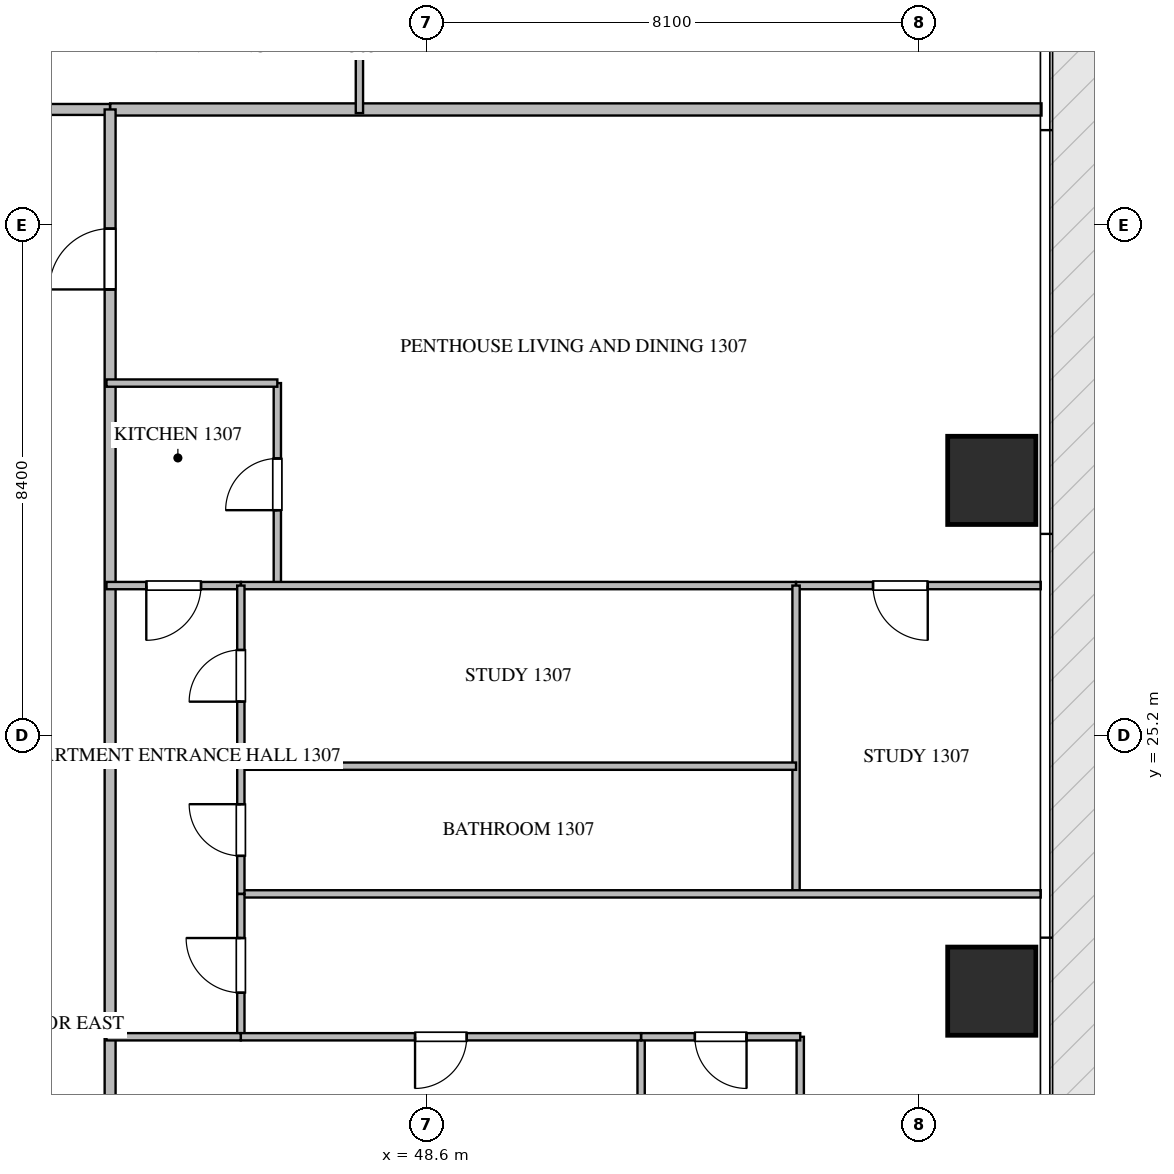
"""IFC4 building model, lengths in metres.
Left out: names, types, materials, properties, quantities, classifications, styles, units other than length and angle.
Written with IfcOpenShell. Run it as: python <this file> out.ifc"""

import sys

from ifc_helpers import new_model, si_unit, direction, frame, frame_2d, origin, origin_2d, place, context, subcontext, project, spatial, rectangle, extrude, source, transform, mapped, element, fill, save


model = new_model("IFC4")
c1 = context("Model", 3, precision=1e-05, world=origin(), true_north=direction((0.0, 1.0)))
c2 = subcontext(c1, "Body", "Model", "MODEL_VIEW")
j1 = project(units=[si_unit("LENGTHUNIT", "METRE"), si_unit("PLANEANGLEUNIT", "RADIAN")], contexts=[c1])
p1 = place(None, origin())
s1 = spatial("IfcSite", under=j1, at=p1, CompositionType="ELEMENT")
p2 = place(p1, origin())
s2 = spatial("IfcBuilding", under=s1, at=p2, CompositionType="ELEMENT")
p3 = place(p2, frame((0.0, 0.0, 56.7)))
s3 = spatial("IfcBuildingStorey", under=s2, at=p3, CompositionType="ELEMENT", Elevation=56.7)
m1 = source(origin(), c2, "Body", "SweptSolid", [
    extrude(rectangle(XDim=1.45, YDim=1.45, at=origin_2d()), origin(), (0.0, 0.0, 1.0), 3.75),
])
for number, where, z_axis, x_axis in (
    (1, (57.9, 21.0, -0.26), (0.0, 0.0, 1.0), (1.0, 0.0, 0.0)),
    (2, (57.9, 29.4, -0.26), (0.0, 0.0, 1.0), (1.0, 0.0, 0.0)),
):
    element("IfcColumn", number, at=place(p3, frame(where, z_axis=z_axis, x_axis=x_axis)), inside=s3, PredefinedType="COLUMN", context=c2, shape_type="MappedRepresentation", body=[
        mapped(m1, transform((0.0, 0.0, 0.0), scale=1.0)),
    ])
p4 = place(p3, frame((43.4, 35.5, 0.0), z_axis=(0.0, 0.0, 1.0), x_axis=(1.0, 0.0, 0.0)))
e3 = element("IfcWall", 3, at=p4, inside=s3, PredefinedType="PARTITIONING", context=c2, shape_type="SweptSolid", body=[
    extrude(rectangle(XDim=15.318, YDim=0.2, at=frame_2d((7.659, 0.0))), origin(), (0.0, 0.0, 1.0), 3.49),
])
p5 = place(p3, frame((21.402, 35.5, 0.0), z_axis=(0.0, 0.0, 1.0), x_axis=(1.0, 0.0, 0.0)))
e4 = element("IfcWall", 4, at=p5, inside=s3, PredefinedType="PARTITIONING", context=c2, shape_type="SweptSolid", body=[
    extrude(rectangle(XDim=21.996, YDim=0.18, at=frame_2d((10.998, 0.0))), origin(), (0.0, 0.0, 1.0), 3.49),
])
p6 = place(p5, frame((15.222, 0.0, 0.0)))
e5 = element("IfcOpeningElement", 5, at=p6, cuts=e4, PredefinedType="OPENING", context=c2, shape_type="SweptSolid", body=[
    extrude(rectangle(XDim=1.0, YDim=2.15, at=frame_2d((0.5, 1.075))), frame((0.0, 0.1, 0.0), z_axis=(0.0, -1.0, 0.0), x_axis=(1.0, 0.0, 0.0)), (0.0, 0.0, 1.0), 0.2),
])
p7 = place(p3, frame((43.4, 14.9, 0.0), z_axis=(0.0, 0.0, 1.0), x_axis=(0.0, 1.0, 0.0)))
e6 = element("IfcWall", 6, at=p7, inside=s3, PredefinedType="PARTITIONING", context=c2, shape_type="SweptSolid", body=[
    extrude(rectangle(XDim=20.6, YDim=0.18, at=frame_2d((10.3, 0.0))), origin(), (0.0, 0.0, 1.0), 3.49),
])
p8 = place(p7, frame((17.64, 0.0, 0.0)))
e7 = element("IfcOpeningElement", 7, at=p8, cuts=e6, PredefinedType="OPENING", context=c2, shape_type="SweptSolid", body=[
    extrude(rectangle(XDim=1.0, YDim=2.15, at=frame_2d((0.5, 1.075))), frame((0.0, 0.1, 0.0), z_axis=(0.0, -1.0, 0.0), x_axis=(1.0, 0.0, 0.0)), (0.0, 0.0, 1.0), 0.2),
])
p9 = place(p3, frame((47.5, 37.648, 0.0), z_axis=(0.0, 0.0, 1.0), x_axis=(0.0, -1.0, 0.0)))
e8 = element("IfcWall", 8, at=p9, inside=s3, PredefinedType="PARTITIONING", context=c2, shape_type="SweptSolid", body=[
    extrude(rectangle(XDim=2.208, YDim=0.12, at=frame_2d((1.104, 0.0))), origin(), (0.0, 0.0, 1.0), 3.49),
])
p10 = place(p3, frame((46.15, 27.67, 0.0), z_axis=(0.0, 0.0, 1.0), x_axis=(0.0, 1.0, 0.0)))
e9 = element("IfcWall", 9, at=p10, inside=s3, PredefinedType="PARTITIONING", context=c2, shape_type="SweptSolid", body=[
    extrude(rectangle(XDim=3.33, YDim=0.12, at=frame_2d((1.665, 0.0))), origin(), (0.0, 0.0, 1.0), 3.49),
])
p11 = place(p10, frame((1.24, 0.0, 0.0)))
e10 = element("IfcOpeningElement", 10, at=p11, cuts=e9, PredefinedType="OPENING", context=c2, shape_type="SweptSolid", body=[
    extrude(rectangle(XDim=0.85, YDim=2.1, at=frame_2d((0.425, 1.05))), frame((0.0, 0.07, 0.0), z_axis=(0.0, -1.0, 0.0), x_axis=(1.0, 0.0, 0.0)), (0.0, 0.0, 1.0), 0.14),
])
p12 = place(p3, frame((46.15, 31.0, 0.0), z_axis=(0.0, 0.0, 1.0), x_axis=(-1.0, 0.0, 0.0)))
e11 = element("IfcWall", 11, at=p12, inside=s3, PredefinedType="PARTITIONING", context=c2, shape_type="SweptSolid", body=[
    extrude(rectangle(XDim=2.81, YDim=0.12, at=frame_2d((1.405, 0.0))), origin(), (0.0, 0.0, 1.0), 3.49),
])
p13 = place(p3, frame((45.55, 27.67, 0.0), z_axis=(0.0, 0.0, 1.0), x_axis=(-1.0, 0.0, 0.0)))
e12 = element("IfcWall", 12, at=p13, inside=s3, PredefinedType="PARTITIONING", context=c2, shape_type="SweptSolid", body=[
    extrude(rectangle(XDim=2.21, YDim=0.12, at=frame_2d((1.105, 0.0))), origin(), (0.0, 0.0, 1.0), 3.49),
])
p14 = place(p13, frame((0.655, 0.0, 0.0)))
e13 = element("IfcOpeningElement", 13, at=p14, cuts=e12, PredefinedType="OPENING", context=c2, shape_type="SweptSolid", body=[
    extrude(rectangle(XDim=0.9, YDim=2.1, at=frame_2d((0.45, 1.05))), frame((0.0, 0.07, 0.0), z_axis=(0.0, -1.0, 0.0), x_axis=(1.0, 0.0, 0.0)), (0.0, 0.0, 1.0), 0.14),
])
p15 = place(p3, frame((58.705, 27.67, 0.0), z_axis=(0.0, 0.0, 1.0), x_axis=(-1.0, 0.0, 0.0)))
e14 = element("IfcWall", 14, at=p15, inside=s3, PredefinedType="PARTITIONING", context=c2, shape_type="SweptSolid", body=[
    extrude(rectangle(XDim=4.024, YDim=0.12, at=frame_2d((2.012, 0.0))), origin(), (0.0, 0.0, 1.0), 3.49),
])
p16 = place(p15, frame((1.858, 0.0, 0.0)))
e15 = element("IfcOpeningElement", 15, at=p16, cuts=e14, PredefinedType="OPENING", context=c2, shape_type="SweptSolid", body=[
    extrude(rectangle(XDim=0.9, YDim=2.1, at=frame_2d((0.45, 1.05))), frame((0.0, 0.07, 0.0), z_axis=(0.0, -1.0, 0.0), x_axis=(1.0, 0.0, 0.0)), (0.0, 0.0, 1.0), 0.14),
])
p17 = place(p3, frame((54.679, 27.67, 0.0), z_axis=(0.0, 0.0, 1.0), x_axis=(-1.0, 0.0, 0.0)))
e16 = element("IfcWall", 16, at=p17, inside=s3, PredefinedType="PARTITIONING", context=c2, shape_type="SweptSolid", body=[
    extrude(rectangle(XDim=9.127, YDim=0.12, at=frame_2d((4.563, 0.0))), origin(), (0.0, 0.0, 1.0), 3.49),
])
p18 = place(p3, frame((54.681, 22.6, 0.0), z_axis=(0.0, 0.0, 1.0), x_axis=(0.0, 1.0, 0.0)))
e17 = element("IfcWall", 17, at=p18, inside=s3, PredefinedType="PARTITIONING", context=c2, shape_type="SweptSolid", body=[
    extrude(rectangle(XDim=5.07, YDim=0.12, at=frame_2d((2.535, 0.0))), origin(), (0.0, 0.0, 1.0), 3.49),
])
p19 = place(p3, frame((58.705, 22.6, 0.0), z_axis=(0.0, 0.0, 1.0), x_axis=(-1.0, 0.0, 0.0)))
e18 = element("IfcWall", 18, at=p19, inside=s3, PredefinedType="PARTITIONING", context=c2, shape_type="SweptSolid", body=[
    extrude(rectangle(XDim=13.155, YDim=0.12, at=frame_2d((6.578, 0.0))), origin(), (0.0, 0.0, 1.0), 3.49),
])
p20 = place(p3, frame((54.681, 24.7, 0.0), z_axis=(0.0, 0.0, 1.0), x_axis=(-1.0, 0.0, 0.0)))
e19 = element("IfcWall", 19, at=p20, inside=s3, PredefinedType="PARTITIONING", context=c2, shape_type="SweptSolid", body=[
    extrude(rectangle(XDim=9.131, YDim=0.12, at=frame_2d((4.565, 0.0))), origin(), (0.0, 0.0, 1.0), 3.49),
])
p21 = place(p3, frame((45.55, 22.6, 0.0), z_axis=(0.0, 0.0, 1.0), x_axis=(0.0, 1.0, 0.0)))
e20 = element("IfcWall", 20, at=p21, inside=s3, PredefinedType="PARTITIONING", context=c2, shape_type="SweptSolid", body=[
    extrude(rectangle(XDim=2.1, YDim=0.12, at=frame_2d((1.05, 0.0))), origin(), (0.0, 0.0, 1.0), 3.49),
])
p22 = place(p21, frame((0.625, 0.0, 0.0)))
e21 = element("IfcOpeningElement", 21, at=p22, cuts=e20, PredefinedType="OPENING", context=c2, shape_type="SweptSolid", body=[
    extrude(rectangle(XDim=0.85, YDim=2.1, at=frame_2d((0.425, 1.05))), frame((0.0, 0.07, 0.0), z_axis=(0.0, -1.0, 0.0), x_axis=(1.0, 0.0, 0.0)), (0.0, 0.0, 1.0), 0.14),
])
p23 = place(p3, frame((45.55, 24.702, 0.0), z_axis=(0.0, 0.0, 1.0), x_axis=(0.0, 1.0, 0.0)))
e22 = element("IfcWall", 22, at=p23, inside=s3, PredefinedType="PARTITIONING", context=c2, shape_type="SweptSolid", body=[
    extrude(rectangle(XDim=2.968, YDim=0.12, at=frame_2d((1.484, 0.0))), origin(), (0.0, 0.0, 1.0), 3.49),
])
p24 = place(p23, frame((1.059, 0.0, 0.0)))
e23 = element("IfcOpeningElement", 23, at=p24, cuts=e22, PredefinedType="OPENING", context=c2, shape_type="SweptSolid", body=[
    extrude(rectangle(XDim=0.85, YDim=2.1, at=frame_2d((0.425, 1.05))), frame((0.0, 0.07, 0.0), z_axis=(0.0, -1.0, 0.0), x_axis=(1.0, 0.0, 0.0)), (0.0, 0.0, 1.0), 0.14),
])
p25 = place(p3, frame((45.55, 20.25, 0.0), z_axis=(0.0, 0.0, 1.0), x_axis=(0.0, 1.0, 0.0)))
e24 = element("IfcWall", 24, at=p25, inside=s3, PredefinedType="PARTITIONING", context=c2, shape_type="SweptSolid", body=[
    extrude(rectangle(XDim=2.348, YDim=0.12, at=frame_2d((1.174, 0.0))), origin(), (0.0, 0.0, 1.0), 3.49),
])
p26 = place(p25, frame((0.724, 0.0, 0.0)))
e25 = element("IfcOpeningElement", 25, at=p26, cuts=e24, PredefinedType="OPENING", context=c2, shape_type="SweptSolid", body=[
    extrude(rectangle(XDim=0.9, YDim=2.1, at=frame_2d((0.45, 1.05))), frame((0.0, 0.07, 0.0), z_axis=(0.0, -1.0, 0.0), x_axis=(1.0, 0.0, 0.0)), (0.0, 0.0, 1.0), 0.14),
])
for number, where, z_axis, x_axis in (
    (26, (54.75, 14.84, 0.0), (0.0, 0.0, 1.0), (0.0, 1.0, 0.0)),
    (27, (52.133, 14.84, 0.0), (0.0, 0.0, 1.0), (0.0, 1.0, 0.0)),
):
    element("IfcWall", number, at=place(p3, frame(where, z_axis=z_axis, x_axis=x_axis)), inside=s3, PredefinedType="PARTITIONING", context=c2, shape_type="SweptSolid", body=[
        extrude(rectangle(XDim=5.41, YDim=0.12, at=frame_2d((2.705, 0.0))), origin(), (0.0, 0.0, 1.0), 3.49),
    ])
p27 = place(p3, frame((54.75, 20.25, 0.0), z_axis=(0.0, 0.0, 1.0), x_axis=(-1.0, 0.0, 0.0)))
e28 = element("IfcWall", 28, at=p27, inside=s3, PredefinedType="PARTITIONING", context=c2, shape_type="SweptSolid", body=[
    extrude(rectangle(XDim=2.617, YDim=0.12, at=frame_2d((1.309, 0.0))), origin(), (0.0, 0.0, 1.0), 3.49),
])
p28 = place(p27, frame((0.883, 0.0, 0.0)))
e29 = element("IfcOpeningElement", 29, at=p28, cuts=e28, PredefinedType="OPENING", context=c2, shape_type="SweptSolid", body=[
    extrude(rectangle(XDim=0.85, YDim=2.1, at=frame_2d((0.425, 1.05))), frame((0.0, 0.07, 0.0), z_axis=(0.0, -1.0, 0.0), x_axis=(1.0, 0.0, 0.0)), (0.0, 0.0, 1.0), 0.14),
])
p29 = place(p3, frame((52.131, 20.25, 0.0), z_axis=(0.0, 0.0, 1.0), x_axis=(-1.0, 0.0, 0.0)))
e30 = element("IfcWall", 30, at=p29, inside=s3, PredefinedType="PARTITIONING", context=c2, shape_type="SweptSolid", body=[
    extrude(rectangle(XDim=6.581, YDim=0.12, at=frame_2d((3.291, 0.0))), origin(), (0.0, 0.0, 1.0), 3.49),
])
p30 = place(p29, frame((2.866, 0.0, 0.0)))
e31 = element("IfcOpeningElement", 31, at=p30, cuts=e30, PredefinedType="OPENING", context=c2, shape_type="SweptSolid", body=[
    extrude(rectangle(XDim=0.85, YDim=2.1, at=frame_2d((0.425, 1.05))), frame((0.0, 0.07, 0.0), z_axis=(0.0, -1.0, 0.0), x_axis=(1.0, 0.0, 0.0)), (0.0, 0.0, 1.0), 0.14),
])
p31 = place(p3, frame((45.548, 20.25, 0.0), z_axis=(0.0, 0.0, 1.0), x_axis=(-1.0, 0.0, 0.0)))
e32 = element("IfcWall", 32, at=p31, inside=s3, PredefinedType="PARTITIONING", context=c2, shape_type="SweptSolid", body=[
    extrude(rectangle(XDim=2.208, YDim=0.12, at=frame_2d((1.104, 0.0))), origin(), (0.0, 0.0, 1.0), 3.49),
])
m2 = source(origin(), c2, "Body", "SweptSolid", [
    extrude(rectangle(XDim=1.0, YDim=2.15, at=frame_2d((0.5, 1.075))), frame((0.0, 0.025, 0.0), z_axis=(0.0, -1.0, 0.0), x_axis=(1.0, 0.0, 0.0)), (0.0, 0.0, 1.0), 0.05),
])
p32 = place(p8, origin())
e33 = element("IfcDoor", 33, at=p32, inside=s3, OperationType="SINGLE_SWING_LEFT", PredefinedType="DOOR", context=c2, shape_type="MappedRepresentation", body=[
    mapped(m2, transform((0.0, 0.0, 0.0), scale=1.0)),
])
fill(e7, e33)
m3 = source(origin(), c2, "Body", "SweptSolid", [
    extrude(rectangle(XDim=0.85, YDim=2.1, at=frame_2d((0.425, 1.05))), frame((0.0, 0.025, 0.0), z_axis=(0.0, -1.0, 0.0), x_axis=(1.0, 0.0, 0.0)), (0.0, 0.0, 1.0), 0.05),
])
p33 = place(p11, origin())
e34 = element("IfcDoor", 34, at=p33, inside=s3, OperationType="SINGLE_SWING_LEFT", PredefinedType="DOOR", context=c2, shape_type="MappedRepresentation", body=[
    mapped(m3, transform((0.0, 0.0, 0.0), scale=1.0)),
])
fill(e10, e34)
m4 = source(origin(), c2, "Body", "SweptSolid", [
    extrude(rectangle(XDim=0.9, YDim=2.1, at=frame_2d((0.45, 1.05))), frame((0.0, 0.025, 0.0), z_axis=(0.0, -1.0, 0.0), x_axis=(1.0, 0.0, 0.0)), (0.0, 0.0, 1.0), 0.05),
])
p34 = place(p14, origin())
e35 = element("IfcDoor", 35, at=p34, inside=s3, OperationType="SINGLE_SWING_RIGHT", PredefinedType="DOOR", context=c2, shape_type="MappedRepresentation", body=[
    mapped(m4, transform((0.0, 0.0, 0.0), scale=1.0)),
])
fill(e13, e35)
p35 = place(p16, origin())
e36 = element("IfcDoor", 36, at=p35, inside=s3, OperationType="SINGLE_SWING_LEFT", PredefinedType="DOOR", context=c2, shape_type="MappedRepresentation", body=[
    mapped(m4, transform((0.0, 0.0, 0.0), scale=1.0)),
])
fill(e15, e36)
p36 = place(p22, origin())
e37 = element("IfcDoor", 37, at=p36, inside=s3, OperationType="SINGLE_SWING_RIGHT", PredefinedType="DOOR", context=c2, shape_type="MappedRepresentation", body=[
    mapped(m3, transform((0.0, 0.0, 0.0), scale=1.0)),
])
fill(e21, e37)
p37 = place(p24, origin())
e38 = element("IfcDoor", 38, at=p37, inside=s3, OperationType="SINGLE_SWING_LEFT", PredefinedType="DOOR", context=c2, shape_type="MappedRepresentation", body=[
    mapped(m3, transform((0.0, 0.0, 0.0), scale=1.0)),
])
fill(e23, e38)
p38 = place(p26, origin())
e39 = element("IfcDoor", 39, at=p38, inside=s3, OperationType="SINGLE_SWING_RIGHT", PredefinedType="DOOR", context=c2, shape_type="MappedRepresentation", body=[
    mapped(m4, transform((0.0, 0.0, 0.0), scale=1.0)),
])
fill(e25, e39)
p39 = place(p28, origin())
e40 = element("IfcDoor", 40, at=p39, inside=s3, OperationType="SINGLE_SWING_LEFT", PredefinedType="DOOR", context=c2, shape_type="MappedRepresentation", body=[
    mapped(m3, transform((0.0, 0.0, 0.0), scale=1.0)),
])
fill(e29, e40)
p40 = place(p30, origin())
e41 = element("IfcDoor", 41, at=p40, inside=s3, OperationType="SINGLE_SWING_RIGHT", PredefinedType="DOOR", context=c2, shape_type="MappedRepresentation", body=[
    mapped(m3, transform((0.0, 0.0, 0.0), scale=1.0)),
])
fill(e31, e41)
save(model, sys.argv[1])
